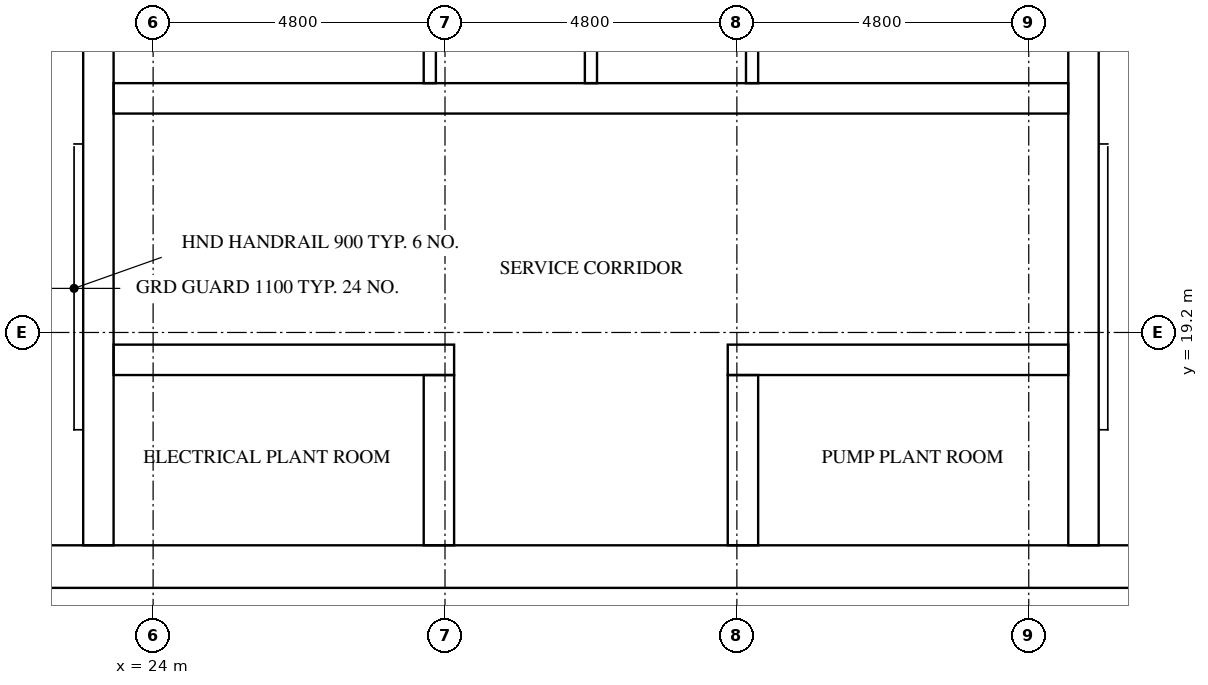
"""IFC4 building model, lengths in metres.
Left out: names, types, materials, properties, quantities, classifications, styles, units other than length and angle.
Written with IfcOpenShell. Run it as: python <this file> out.ifc"""

import sys

from ifc_helpers import new_model, si_unit, direction, frame, frame_2d, origin, place, context, subcontext, project, spatial, rectangle, extrude, element, fill, save


model = new_model("IFC4")
c1 = context("Model", 3, precision=1e-05, world=origin(), true_north=direction((0.0, 1.0)))
c2 = subcontext(c1, "Body", "Model", "MODEL_VIEW")
j1 = project(units=[si_unit("LENGTHUNIT", "METRE"), si_unit("PLANEANGLEUNIT", "RADIAN")], contexts=[c1])
p1 = place(None, origin())
s1 = spatial("IfcSite", under=j1, at=p1, CompositionType="ELEMENT")
p2 = place(p1, origin())
s2 = spatial("IfcBuilding", under=s1, at=p2, CompositionType="ELEMENT")
p3 = place(p2, frame((0.0, 0.0, 173.5)))
s3 = spatial("IfcBuildingStorey", under=s2, at=p3, CompositionType="ELEMENT", Elevation=173.5)
p4 = place(p3, frame((15.0, 15.35, 0.0), z_axis=(0.0, 0.0, 1.0), x_axis=(1.0, 0.0, 0.0)))
e1 = element("IfcWall", 1, at=p4, inside=s3, PredefinedType="SHEAR", context=c2, shape_type="SweptSolid", body=[
    extrude(rectangle(XDim=32.4, YDim=0.7, at=frame_2d((16.2, 0.0))), origin(), (0.0, 0.0, 1.0), 5.1),
])
p5 = place(p4, frame((15.3, 0.0, 0.0)))
e2 = element("IfcOpeningElement", 2, at=p5, cuts=e1, PredefinedType="OPENING", context=c2, shape_type="SweptSolid", body=[
    extrude(rectangle(XDim=1.8, YDim=2.1, at=frame_2d((0.9, 1.05))), frame((0.0, 0.36, 0.0), z_axis=(0.0, -1.0, 0.0), x_axis=(1.0, 0.0, 0.0)), (0.0, 0.0, 1.0), 0.72),
])
p6 = place(p3, frame((23.1, 15.7, 0.0), z_axis=(0.0, 0.0, 1.0), x_axis=(0.0, 1.0, 0.0)))
e3 = element("IfcWall", 3, at=p6, inside=s3, PredefinedType="SHEAR", context=c2, shape_type="SweptSolid", body=[
    extrude(rectangle(XDim=21.4, YDim=0.5, at=frame_2d((10.7, 0.0))), origin(), (0.0, 0.0, 1.0), 5.1),
])
p7 = place(p3, frame((39.3, 15.7, 0.0), z_axis=(0.0, 0.0, 1.0), x_axis=(0.0, 1.0, 0.0)))
e4 = element("IfcWall", 4, at=p7, inside=s3, PredefinedType="SHEAR", context=c2, shape_type="SweptSolid", body=[
    extrude(rectangle(XDim=8.55, YDim=0.5, at=frame_2d((4.275, 0.0))), origin(), (0.0, 0.0, 1.0), 5.1),
])
p8 = place(p3, frame((23.35, 18.75, 0.0), z_axis=(0.0, 0.0, 1.0), x_axis=(1.0, 0.0, 0.0)))
e5 = element("IfcWall", 5, at=p8, inside=s3, PredefinedType="SHEAR", context=c2, shape_type="SweptSolid", body=[
    extrude(rectangle(XDim=5.6, YDim=0.5, at=frame_2d((2.8, 0.0))), origin(), (0.0, 0.0, 1.0), 5.1),
])
p9 = place(p8, frame((2.05, 0.0, 0.0)))
e6 = element("IfcOpeningElement", 6, at=p9, cuts=e5, PredefinedType="OPENING", context=c2, shape_type="SweptSolid", body=[
    extrude(rectangle(XDim=1.0, YDim=2.1, at=frame_2d((0.5, 1.05))), frame((0.0, 0.26, 0.0), z_axis=(0.0, -1.0, 0.0), x_axis=(1.0, 0.0, 0.0)), (0.0, 0.0, 1.0), 0.52),
])
p10 = place(p3, frame((33.45, 18.75, 0.0), z_axis=(0.0, 0.0, 1.0), x_axis=(1.0, 0.0, 0.0)))
e7 = element("IfcWall", 7, at=p10, inside=s3, PredefinedType="SHEAR", context=c2, shape_type="SweptSolid", body=[
    extrude(rectangle(XDim=5.6, YDim=0.5, at=frame_2d((2.8, 0.0))), origin(), (0.0, 0.0, 1.0), 5.1),
])
p11 = place(p10, frame((2.55, 0.0, 0.0)))
e8 = element("IfcOpeningElement", 8, at=p11, cuts=e7, PredefinedType="OPENING", context=c2, shape_type="SweptSolid", body=[
    extrude(rectangle(XDim=1.0, YDim=2.1, at=frame_2d((0.5, 1.05))), frame((0.0, 0.26, 0.0), z_axis=(0.0, -1.0, 0.0), x_axis=(1.0, 0.0, 0.0)), (0.0, 0.0, 1.0), 0.52),
])
p12 = place(p3, frame((23.35, 23.05, 0.0), z_axis=(0.0, 0.0, 1.0), x_axis=(1.0, 0.0, 0.0)))
e9 = element("IfcWall", 9, at=p12, inside=s3, PredefinedType="SHEAR", context=c2, shape_type="SweptSolid", body=[
    extrude(rectangle(XDim=15.7, YDim=0.5, at=frame_2d((7.85, 0.0))), origin(), (0.0, 0.0, 1.0), 5.1),
])
p13 = place(p12, frame((2.05, 0.0, 0.0)))
e10 = element("IfcOpeningElement", 10, at=p13, cuts=e9, PredefinedType="OPENING", context=c2, shape_type="SweptSolid", body=[
    extrude(rectangle(XDim=1.0, YDim=2.1, at=frame_2d((0.5, 1.05))), frame((0.0, 0.26, 0.0), z_axis=(0.0, -1.0, 0.0), x_axis=(1.0, 0.0, 0.0)), (0.0, 0.0, 1.0), 0.52),
])
p14 = place(p12, frame((12.65, 0.0, 0.0)))
e11 = element("IfcOpeningElement", 11, at=p14, cuts=e9, PredefinedType="OPENING", context=c2, shape_type="SweptSolid", body=[
    extrude(rectangle(XDim=1.0, YDim=2.1, at=frame_2d((0.5, 1.05))), frame((0.0, 0.26, 0.0), z_axis=(0.0, -1.0, 0.0), x_axis=(1.0, 0.0, 0.0)), (0.0, 0.0, 1.0), 0.52),
])
for number, where, z_axis, x_axis in (
    (12, (28.7, 15.7, 0.0), (0.0, 0.0, 1.0), (0.0, 1.0, 0.0)),
    (13, (33.7, 15.7, 0.0), (0.0, 0.0, 1.0), (0.0, 1.0, 0.0)),
):
    element("IfcWall", number, at=place(p3, frame(where, z_axis=z_axis, x_axis=x_axis)), inside=s3, PredefinedType="SHEAR", context=c2, shape_type="SweptSolid", body=[
        extrude(rectangle(XDim=2.8, YDim=0.5, at=frame_2d((1.4, 0.0))), origin(), (0.0, 0.0, 1.0), 5.1),
    ])
for number, where, z_axis, x_axis in (
    (14, (28.55, 23.3, 0.0), (0.0, 0.0, 1.0), (0.0, 1.0, 0.0)),
    (15, (31.2, 23.3, 0.0), (0.0, 0.0, 1.0), (0.0, 1.0, 0.0)),
    (16, (33.85, 23.3, 0.0), (0.0, 0.0, 1.0), (0.0, 1.0, 0.0)),
):
    element("IfcWall", number, at=place(p3, frame(where, z_axis=z_axis, x_axis=x_axis)), inside=s3, PredefinedType="SOLIDWALL", context=c2, shape_type="SweptSolid", body=[
        extrude(rectangle(XDim=2.6, YDim=0.2, at=frame_2d((1.3, 0.0))), origin(), (0.0, 0.0, 1.0), 5.1),
    ])
p15 = place(p5, frame((1.8, 0.0, 0.0), z_axis=(0.0, 0.0, 1.0), x_axis=(-1.0, 0.0, 0.0)))
e17 = element("IfcDoor", 17, at=p15, inside=s3, OperationType="DOUBLE_DOOR_SINGLE_SWING", PredefinedType="DOOR", context=c2, shape_type="SweptSolid", body=[
    extrude(rectangle(XDim=1.8, YDim=2.1, at=frame_2d((0.9, 1.05))), frame((0.0, 0.025, 0.0), z_axis=(0.0, -1.0, 0.0), x_axis=(1.0, 0.0, 0.0)), (0.0, 0.0, 1.0), 0.05),
])
fill(e2, e17)
p16 = place(p13, frame((1.0, 0.0, 0.0), z_axis=(0.0, 0.0, 1.0), x_axis=(-1.0, 0.0, 0.0)))
e18 = element("IfcDoor", 18, at=p16, inside=s3, OperationType="SINGLE_SWING_RIGHT", PredefinedType="DOOR", context=c2, shape_type="SweptSolid", body=[
    extrude(rectangle(XDim=1.0, YDim=2.1, at=frame_2d((0.5, 1.05))), frame((0.0, 0.025, 0.0), z_axis=(0.0, -1.0, 0.0), x_axis=(1.0, 0.0, 0.0)), (0.0, 0.0, 1.0), 0.05),
])
fill(e10, e18)
p17 = place(p14, frame((1.0, 0.0, 0.0), z_axis=(0.0, 0.0, 1.0), x_axis=(-1.0, 0.0, 0.0)))
e19 = element("IfcDoor", 19, at=p17, inside=s3, OperationType="SINGLE_SWING_LEFT", PredefinedType="DOOR", context=c2, shape_type="SweptSolid", body=[
    extrude(rectangle(XDim=1.0, YDim=2.1, at=frame_2d((0.5, 1.05))), frame((0.0, 0.025, 0.0), z_axis=(0.0, -1.0, 0.0), x_axis=(1.0, 0.0, 0.0)), (0.0, 0.0, 1.0), 0.05),
])
fill(e11, e19)
p18 = place(p9, origin())
e20 = element("IfcDoor", 20, at=p18, inside=s3, OperationType="SINGLE_SWING_RIGHT", PredefinedType="DOOR", context=c2, shape_type="SweptSolid", body=[
    extrude(rectangle(XDim=1.0, YDim=2.1, at=frame_2d((0.5, 1.05))), frame((0.0, 0.025, 0.0), z_axis=(0.0, -1.0, 0.0), x_axis=(1.0, 0.0, 0.0)), (0.0, 0.0, 1.0), 0.05),
])
fill(e6, e20)
p19 = place(p11, origin())
e21 = element("IfcDoor", 21, at=p19, inside=s3, OperationType="SINGLE_SWING_LEFT", PredefinedType="DOOR", context=c2, shape_type="SweptSolid", body=[
    extrude(rectangle(XDim=1.0, YDim=2.1, at=frame_2d((0.5, 1.05))), frame((0.0, 0.025, 0.0), z_axis=(0.0, -1.0, 0.0), x_axis=(1.0, 0.0, 0.0)), (0.0, 0.0, 1.0), 0.05),
])
fill(e8, e21)
save(model, sys.argv[1])
